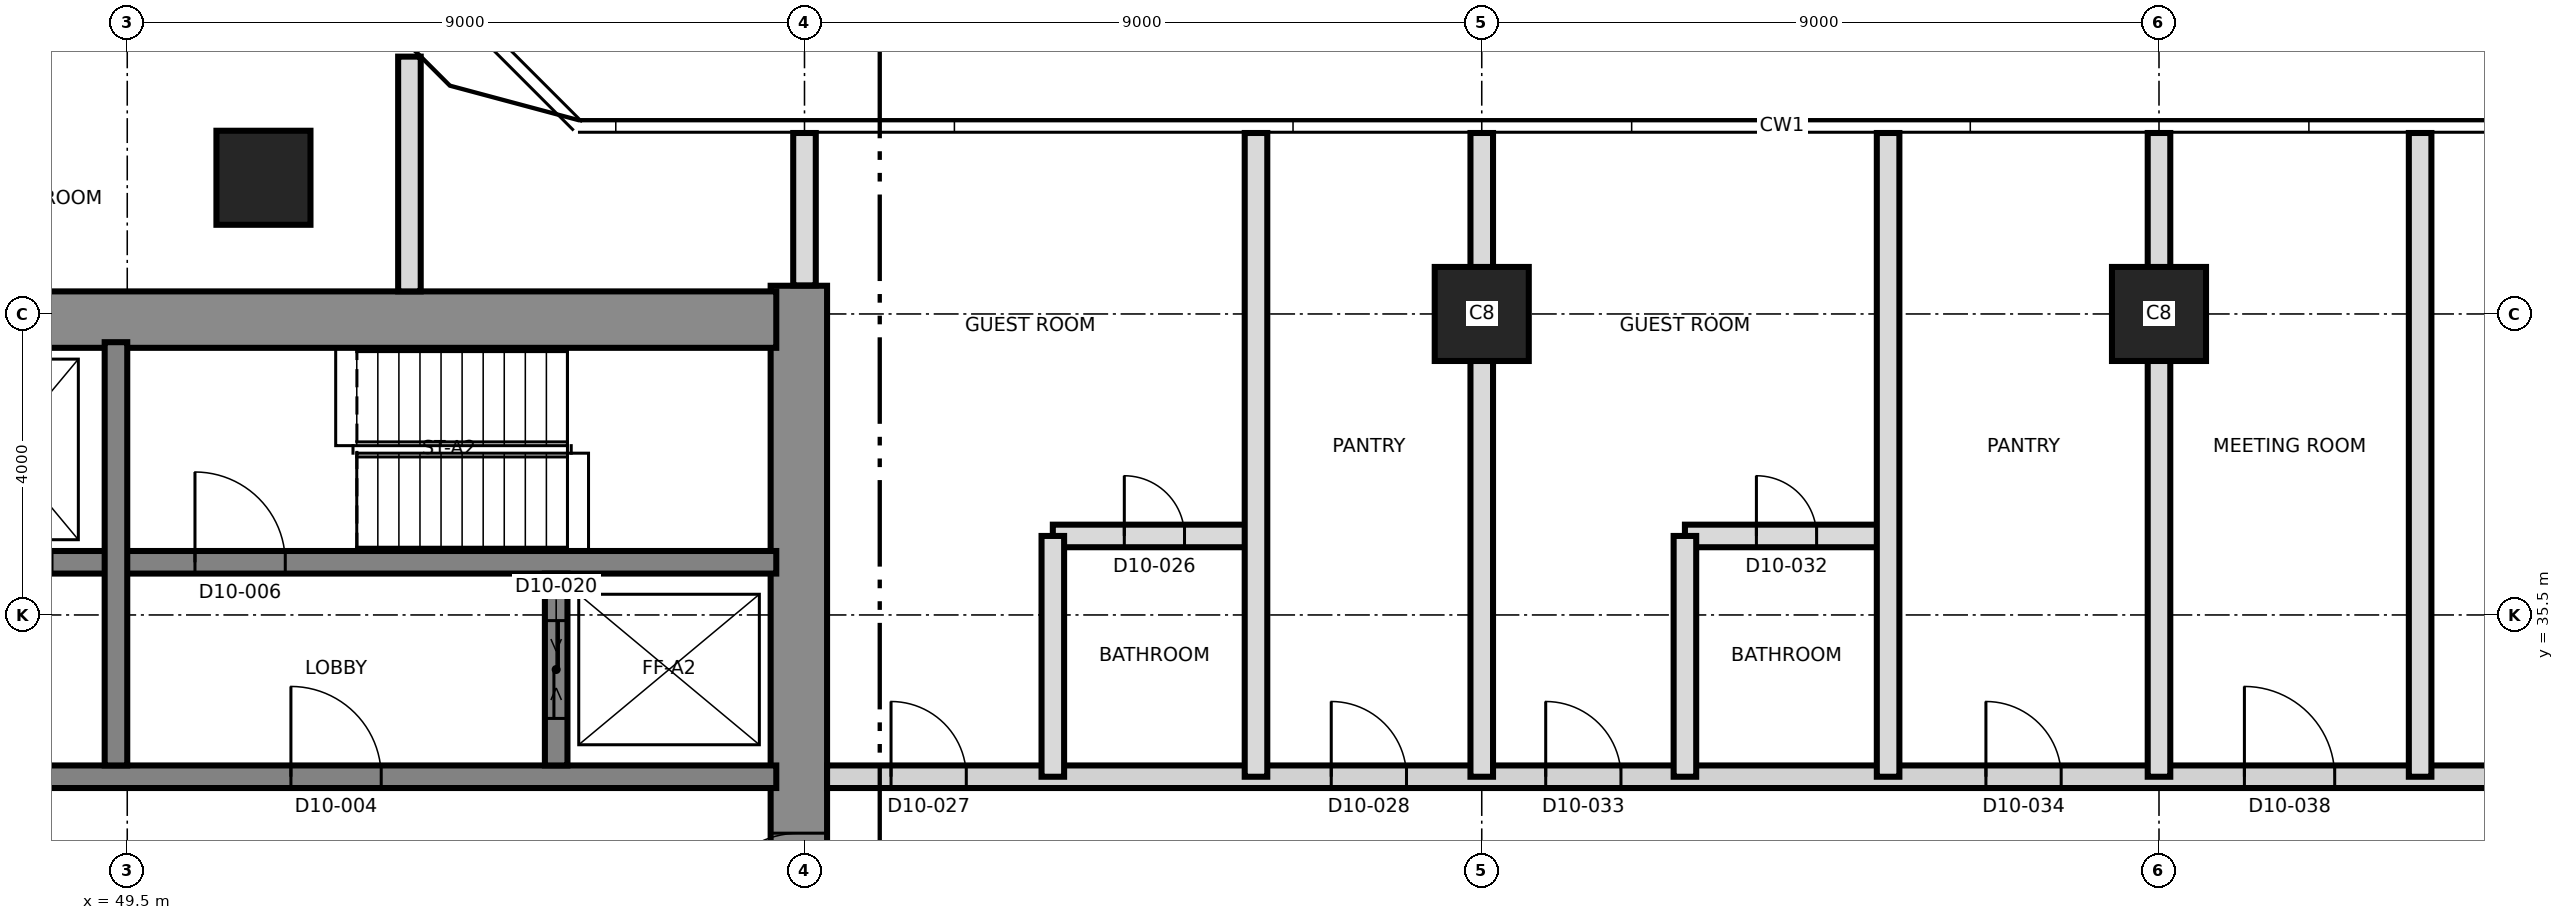
"""IFC4 building model, lengths in metres.
Left out: names, types, materials, properties, quantities, classifications, styles, units other than length and angle.
Written with IfcOpenShell. Run it as: python <this file> out.ifc"""

import sys

from ifc_helpers import new_model, si_unit, direction, frame, frame_2d, origin, origin_2d, place, context, subcontext, project, spatial, rectangle, extrude, element, fill, save


model = new_model("IFC4")
c1 = context("Model", 3, precision=1e-05, world=origin(), true_north=direction((0.0, 1.0)))
c2 = subcontext(c1, "Body", "Model", "MODEL_VIEW")
j1 = project(units=[si_unit("LENGTHUNIT", "METRE"), si_unit("PLANEANGLEUNIT", "RADIAN")], contexts=[c1])
p1 = place(None, origin())
s1 = spatial("IfcSite", under=j1, at=p1, CompositionType="ELEMENT")
p2 = place(p1, origin())
s2 = spatial("IfcBuilding", under=s1, at=p2, CompositionType="ELEMENT")
p3 = place(p2, frame((0.0, 0.0, 116.7)))
s3 = spatial("IfcBuildingStorey", under=s2, at=p3, CompositionType="ELEMENT", Elevation=116.7)
p4 = place(p3, frame((58.425, 21.125, 0.0), z_axis=(0.0, 0.0, 1.0), x_axis=(0.0, 1.0, 0.0)))
e1 = element("IfcWall", 1, at=p4, inside=s3, PredefinedType="SHEAR", context=c2, shape_type="SweptSolid", body=[
    extrude(rectangle(XDim=18.75, YDim=0.75, at=frame_2d((9.375, 0.0))), origin(), (0.0, 0.0, 1.0), 3.7),
])
p5 = place(p4, frame((10.275, 0.0, 0.0)))
e2 = element("IfcOpeningElement", 2, at=p5, cuts=e1, PredefinedType="OPENING", context=c2, shape_type="SweptSolid", body=[
    extrude(rectangle(XDim=1.2, YDim=2.1, at=frame_2d((0.6, 1.05))), frame((0.0, 0.385, 0.0), z_axis=(0.0, -1.0, 0.0), x_axis=(1.0, 0.0, 0.0)), (0.0, 0.0, 1.0), 0.77),
])
p6 = place(p3, frame((31.125, 39.425, 0.0), z_axis=(0.0, 0.0, 1.0), x_axis=(1.0, 0.0, 0.0)))
e3 = element("IfcWall", 3, at=p6, inside=s3, PredefinedType="SHEAR", context=c2, shape_type="SweptSolid", body=[
    extrude(rectangle(XDim=27.0, YDim=0.75, at=frame_2d((13.5, 0.0))), origin(), (0.0, 0.0, 1.0), 3.7),
])
p7 = place(p6, frame((10.575, 0.0, 0.0)))
e4 = element("IfcOpeningElement", 4, at=p7, cuts=e3, PredefinedType="OPENING", context=c2, shape_type="SweptSolid", body=[
    extrude(rectangle(XDim=1.2, YDim=2.1, at=frame_2d((0.6, 1.05))), frame((0.0, 0.385, 0.0), z_axis=(0.0, -1.0, 0.0), x_axis=(1.0, 0.0, 0.0)), (0.0, 0.0, 1.0), 0.77),
])
p8 = place(p3, frame((31.875, 33.35, 0.0), z_axis=(0.0, 0.0, 1.0), x_axis=(1.0, 0.0, 0.0)))
e5 = element("IfcWall", 5, at=p8, inside=s3, PredefinedType="SHEAR", context=c2, shape_type="SweptSolid", body=[
    extrude(rectangle(XDim=26.25, YDim=0.3, at=frame_2d((13.125, 0.0))), origin(), (0.0, 0.0, 1.0), 3.7),
])
p9 = place(p8, frame((13.775, 0.0, 0.0)))
e6 = element("IfcOpeningElement", 6, at=p9, cuts=e5, PredefinedType="OPENING", context=c2, shape_type="SweptSolid", body=[
    extrude(rectangle(XDim=1.4, YDim=2.1, at=frame_2d((0.7, 1.05))), frame((0.0, 0.16, 0.0), z_axis=(0.0, -1.0, 0.0), x_axis=(1.0, 0.0, 0.0)), (0.0, 0.0, 1.0), 0.32),
])
p10 = place(p8, frame((5.25, 0.0, 0.0)))
e7 = element("IfcOpeningElement", 7, at=p10, cuts=e5, PredefinedType="OPENING", context=c2, shape_type="SweptSolid", body=[
    extrude(rectangle(XDim=1.2, YDim=2.1, at=frame_2d((0.6, 1.05))), frame((0.0, 0.16, 0.0), z_axis=(0.0, -1.0, 0.0), x_axis=(1.0, 0.0, 0.0)), (0.0, 0.0, 1.0), 0.32),
])
p11 = place(p8, frame((19.8, 0.0, 0.0)))
e8 = element("IfcOpeningElement", 8, at=p11, cuts=e5, PredefinedType="OPENING", context=c2, shape_type="SweptSolid", body=[
    extrude(rectangle(XDim=1.2, YDim=2.1, at=frame_2d((0.6, 1.05))), frame((0.0, 0.16, 0.0), z_axis=(0.0, -1.0, 0.0), x_axis=(1.0, 0.0, 0.0)), (0.0, 0.0, 1.0), 0.32),
])
p12 = place(p3, frame((43.5, 36.2, 0.0), z_axis=(0.0, 0.0, 1.0), x_axis=(1.0, 0.0, 0.0)))
e9 = element("IfcWall", 9, at=p12, inside=s3, PredefinedType="SHEAR", context=c2, shape_type="SweptSolid", body=[
    extrude(rectangle(XDim=14.625, YDim=0.3, at=frame_2d((7.312, 0.0))), origin(), (0.0, 0.0, 1.0), 3.7),
])
p13 = place(p12, frame((6.9, 0.0, 0.0)))
e10 = element("IfcOpeningElement", 10, at=p13, cuts=e9, PredefinedType="OPENING", context=c2, shape_type="SweptSolid", body=[
    extrude(rectangle(XDim=1.2, YDim=2.1, at=frame_2d((0.6, 1.05))), frame((0.0, 0.16, 0.0), z_axis=(0.0, -1.0, 0.0), x_axis=(1.0, 0.0, 0.0)), (0.0, 0.0, 1.0), 0.32),
])
p14 = place(p12, frame((0.7, 0.0, 0.0)))
e11 = element("IfcOpeningElement", 11, at=p14, cuts=e9, PredefinedType="OPENING", context=c2, shape_type="SweptSolid", body=[
    extrude(rectangle(XDim=1.3, YDim=2.4, at=frame_2d((0.65, 1.2))), frame((0.0, 0.16, 0.0), z_axis=(0.0, -1.0, 0.0), x_axis=(1.0, 0.0, 0.0)), (0.0, 0.0, 1.0), 0.32),
])
p15 = place(p12, frame((3.7, 0.0, 0.0)))
e12 = element("IfcOpeningElement", 12, at=p15, cuts=e9, PredefinedType="OPENING", context=c2, shape_type="SweptSolid", body=[
    extrude(rectangle(XDim=1.3, YDim=2.4, at=frame_2d((0.65, 1.2))), frame((0.0, 0.16, 0.0), z_axis=(0.0, -1.0, 0.0), x_axis=(1.0, 0.0, 0.0)), (0.0, 0.0, 1.0), 0.32),
])
p16 = place(p3, frame((49.35, 33.5, 0.0), z_axis=(0.0, 0.0, 1.0), x_axis=(0.0, 1.0, 0.0)))
e13 = element("IfcWall", 13, at=p16, inside=s3, PredefinedType="SHEAR", context=c2, shape_type="SweptSolid", body=[
    extrude(rectangle(XDim=5.625, YDim=0.3, at=frame_2d((2.812, 0.0))), origin(), (0.0, 0.0, 1.0), 3.7),
])
p17 = place(p3, frame((55.2, 33.5, 0.0), z_axis=(0.0, 0.0, 1.0), x_axis=(0.0, 1.0, 0.0)))
e14 = element("IfcWall", 14, at=p17, inside=s3, PredefinedType="SHEAR", context=c2, shape_type="SweptSolid", body=[
    extrude(rectangle(XDim=2.55, YDim=0.3, at=frame_2d((1.275, 0.0))), origin(), (0.0, 0.0, 1.0), 3.7),
])
p18 = place(p17, frame((0.625, 0.0, 0.0)))
e15 = element("IfcOpeningElement", 15, at=p18, cuts=e14, PredefinedType="OPENING", context=c2, shape_type="SweptSolid", body=[
    extrude(rectangle(XDim=1.3, YDim=2.4, at=frame_2d((0.65, 1.2))), frame((0.0, 0.16, 0.0), z_axis=(0.0, -1.0, 0.0), x_axis=(1.0, 0.0, 0.0)), (0.0, 0.0, 1.0), 0.32),
])
for number, where, z_axis, x_axis in (
    (16, (67.5, 39.5, 0.0), (0.0, 0.0, 1.0), (1.0, 0.0, 0.0)),
    (17, (76.5, 39.5, 0.0), (0.0, 0.0, 1.0), (1.0, 0.0, 0.0)),
    (18, (51.31, 41.31, 0.0), (0.0, 0.0, 1.0), (1.0, 0.0, 0.0)),
):
    element("IfcColumn", number, at=place(p3, frame(where, z_axis=z_axis, x_axis=x_axis)), inside=s3, PredefinedType="COLUMN", context=c2, shape_type="SweptSolid", body=[
        extrude(rectangle(XDim=1.25, YDim=1.25, at=origin_2d()), origin(), (0.0, 0.0, 1.0), 3.7),
    ])
p19 = place(p3, frame((58.8, 33.35, 0.0), z_axis=(0.0, 0.0, 1.0), x_axis=(1.0, 0.0, 0.0)))
e19 = element("IfcWall", 19, at=p19, inside=s3, PredefinedType="PARTITIONING", context=c2, shape_type="SweptSolid", body=[
    extrude(rectangle(XDim=26.53, YDim=0.3, at=frame_2d((13.265, 0.0))), origin(), (0.0, 0.0, 1.0), 3.4),
])
p20 = place(p19, frame((0.85, 0.0, 0.0)))
e20 = element("IfcOpeningElement", 20, at=p20, cuts=e19, PredefinedType="OPENING", context=c2, shape_type="SweptSolid", body=[
    extrude(rectangle(XDim=1.0, YDim=2.1, at=frame_2d((0.5, 1.05))), frame((0.0, 0.16, 0.0), z_axis=(0.0, -1.0, 0.0), x_axis=(1.0, 0.0, 0.0)), (0.0, 0.0, 1.0), 0.32),
])
p21 = place(p19, frame((6.7, 0.0, 0.0)))
e21 = element("IfcOpeningElement", 21, at=p21, cuts=e19, PredefinedType="OPENING", context=c2, shape_type="SweptSolid", body=[
    extrude(rectangle(XDim=1.0, YDim=2.1, at=frame_2d((0.5, 1.05))), frame((0.0, 0.16, 0.0), z_axis=(0.0, -1.0, 0.0), x_axis=(1.0, 0.0, 0.0)), (0.0, 0.0, 1.0), 0.32),
])
p22 = place(p19, frame((9.55, 0.0, 0.0)))
e22 = element("IfcOpeningElement", 22, at=p22, cuts=e19, PredefinedType="OPENING", context=c2, shape_type="SweptSolid", body=[
    extrude(rectangle(XDim=1.0, YDim=2.1, at=frame_2d((0.5, 1.05))), frame((0.0, 0.16, 0.0), z_axis=(0.0, -1.0, 0.0), x_axis=(1.0, 0.0, 0.0)), (0.0, 0.0, 1.0), 0.32),
])
p23 = place(p19, frame((15.4, 0.0, 0.0)))
e23 = element("IfcOpeningElement", 23, at=p23, cuts=e19, PredefinedType="OPENING", context=c2, shape_type="SweptSolid", body=[
    extrude(rectangle(XDim=1.0, YDim=2.1, at=frame_2d((0.5, 1.05))), frame((0.0, 0.16, 0.0), z_axis=(0.0, -1.0, 0.0), x_axis=(1.0, 0.0, 0.0)), (0.0, 0.0, 1.0), 0.32),
])
p24 = place(p19, frame((18.835, 0.0, 0.0)))
e24 = element("IfcOpeningElement", 24, at=p24, cuts=e19, PredefinedType="OPENING", context=c2, shape_type="SweptSolid", body=[
    extrude(rectangle(XDim=1.2, YDim=2.1, at=frame_2d((0.6, 1.05))), frame((0.0, 0.16, 0.0), z_axis=(0.0, -1.0, 0.0), x_axis=(1.0, 0.0, 0.0)), (0.0, 0.0, 1.0), 0.32),
])
p25 = place(p19, frame((22.085, 0.0, 0.0)))
e25 = element("IfcOpeningElement", 25, at=p25, cuts=e19, PredefinedType="OPENING", context=c2, shape_type="SweptSolid", body=[
    extrude(rectangle(XDim=1.0, YDim=2.1, at=frame_2d((0.5, 1.05))), frame((0.0, 0.16, 0.0), z_axis=(0.0, -1.0, 0.0), x_axis=(1.0, 0.0, 0.0)), (0.0, 0.0, 1.0), 0.32),
])
p26 = place(p3, frame((61.8, 36.55, 0.0), z_axis=(0.0, 0.0, 1.0), x_axis=(1.0, 0.0, 0.0)))
e26 = element("IfcWall", 26, at=p26, inside=s3, PredefinedType="PARTITIONING", context=c2, shape_type="SweptSolid", body=[
    extrude(rectangle(XDim=2.7, YDim=0.3, at=frame_2d((1.35, 0.0))), origin(), (0.0, 0.0, 1.0), 3.4),
])
p27 = place(p26, frame((0.95, 0.0, 0.0)))
e27 = element("IfcOpeningElement", 27, at=p27, cuts=e26, PredefinedType="OPENING", context=c2, shape_type="SweptSolid", body=[
    extrude(rectangle(XDim=0.8, YDim=2.1, at=frame_2d((0.4, 1.05))), frame((0.0, 0.16, 0.0), z_axis=(0.0, -1.0, 0.0), x_axis=(1.0, 0.0, 0.0)), (0.0, 0.0, 1.0), 0.32),
])
p28 = place(p3, frame((70.2, 36.55, 0.0), z_axis=(0.0, 0.0, 1.0), x_axis=(1.0, 0.0, 0.0)))
e28 = element("IfcWall", 28, at=p28, inside=s3, PredefinedType="PARTITIONING", context=c2, shape_type="SweptSolid", body=[
    extrude(rectangle(XDim=2.7, YDim=0.3, at=frame_2d((1.35, 0.0))), origin(), (0.0, 0.0, 1.0), 3.4),
])
p29 = place(p28, frame((0.95, 0.0, 0.0)))
e29 = element("IfcOpeningElement", 29, at=p29, cuts=e28, PredefinedType="OPENING", context=c2, shape_type="SweptSolid", body=[
    extrude(rectangle(XDim=0.8, YDim=2.1, at=frame_2d((0.4, 1.05))), frame((0.0, 0.16, 0.0), z_axis=(0.0, -1.0, 0.0), x_axis=(1.0, 0.0, 0.0)), (0.0, 0.0, 1.0), 0.32),
])
p30 = place(p3, frame((53.25, 39.8, 0.0), z_axis=(0.0, 0.0, 1.0), x_axis=(0.0, 1.0, 0.0)))
e30 = element("IfcWall", 30, at=p30, inside=s3, PredefinedType="PARTITIONING", context=c2, shape_type="SweptSolid", body=[
    extrude(rectangle(XDim=3.12, YDim=0.3, at=frame_2d((1.56, 0.0))), origin(), (0.0, 0.0, 1.0), 3.4),
])
p31 = place(p3, frame((58.5, 39.88, 0.0), z_axis=(0.0, 0.0, 1.0), x_axis=(0.0, 1.0, 0.0)))
e31 = element("IfcWall", 31, at=p31, inside=s3, PredefinedType="PARTITIONING", context=c2, shape_type="SweptSolid", body=[
    extrude(rectangle(XDim=2.025, YDim=0.3, at=frame_2d((1.013, 0.0))), origin(), (0.0, 0.0, 1.0), 3.4),
])
p32 = place(p3, frame((61.8, 33.35, 0.0), z_axis=(0.0, 0.0, 1.0), x_axis=(0.0, 1.0, 0.0)))
e32 = element("IfcWall", 32, at=p32, inside=s3, PredefinedType="PARTITIONING", context=c2, shape_type="SweptSolid", body=[
    extrude(rectangle(XDim=3.2, YDim=0.3, at=frame_2d((1.6, 0.0))), origin(), (0.0, 0.0, 1.0), 3.4),
])
for number, where, z_axis, x_axis in (
    (33, (64.5, 33.35, 0.0), (0.0, 0.0, 1.0), (0.0, 1.0, 0.0)),
    (34, (67.5, 33.35, 0.0), (0.0, 0.0, 1.0), (0.0, 1.0, 0.0)),
):
    element("IfcWall", number, at=place(p3, frame(where, z_axis=z_axis, x_axis=x_axis)), inside=s3, PredefinedType="PARTITIONING", context=c2, shape_type="SweptSolid", body=[
        extrude(rectangle(XDim=8.555, YDim=0.3, at=frame_2d((4.277, 0.0))), origin(), (0.0, 0.0, 1.0), 3.4),
    ])
p33 = place(p3, frame((70.2, 33.35, 0.0), z_axis=(0.0, 0.0, 1.0), x_axis=(0.0, 1.0, 0.0)))
e35 = element("IfcWall", 35, at=p33, inside=s3, PredefinedType="PARTITIONING", context=c2, shape_type="SweptSolid", body=[
    extrude(rectangle(XDim=3.2, YDim=0.3, at=frame_2d((1.6, 0.0))), origin(), (0.0, 0.0, 1.0), 3.4),
])
for number, where, z_axis, x_axis in (
    (36, (72.9, 33.35, 0.0), (0.0, 0.0, 1.0), (0.0, 1.0, 0.0)),
    (37, (76.5, 33.35, 0.0), (0.0, 0.0, 1.0), (0.0, 1.0, 0.0)),
    (38, (79.97, 33.35, 0.0), (0.0, 0.0, 1.0), (0.0, 1.0, 0.0)),
):
    element("IfcWall", number, at=place(p3, frame(where, z_axis=z_axis, x_axis=x_axis)), inside=s3, PredefinedType="PARTITIONING", context=c2, shape_type="SweptSolid", body=[
        extrude(rectangle(XDim=8.555, YDim=0.3, at=frame_2d((4.277, 0.0))), origin(), (0.0, 0.0, 1.0), 3.4),
    ])
p34 = place(p11, origin())
e39 = element("IfcDoor", 39, at=p34, inside=s3, OperationType="SINGLE_SWING_RIGHT", PredefinedType="DOOR", context=c2, shape_type="SweptSolid", body=[
    extrude(rectangle(XDim=1.2, YDim=2.1, at=frame_2d((0.6, 1.05))), frame((0.0, 0.025, 0.0), z_axis=(0.0, -1.0, 0.0), x_axis=(1.0, 0.0, 0.0)), (0.0, 0.0, 1.0), 0.05),
])
fill(e8, e39)
p35 = place(p13, origin())
e40 = element("IfcDoor", 40, at=p35, inside=s3, OperationType="SINGLE_SWING_LEFT", PredefinedType="DOOR", context=c2, shape_type="SweptSolid", body=[
    extrude(rectangle(XDim=1.2, YDim=2.1, at=frame_2d((0.6, 1.05))), frame((0.0, 0.025, 0.0), z_axis=(0.0, -1.0, 0.0), x_axis=(1.0, 0.0, 0.0)), (0.0, 0.0, 1.0), 0.05),
])
fill(e10, e40)
p36 = place(p5, origin())
e41 = element("IfcDoor", 41, at=p36, inside=s3, OperationType="SINGLE_SWING_LEFT", PredefinedType="DOOR", context=c2, shape_type="SweptSolid", body=[
    extrude(rectangle(XDim=1.2, YDim=2.1, at=frame_2d((0.6, 1.05))), frame((0.0, 0.025, 0.0), z_axis=(0.0, -1.0, 0.0), x_axis=(1.0, 0.0, 0.0)), (0.0, 0.0, 1.0), 0.05),
])
fill(e2, e41)
p37 = place(p18, origin())
e42 = element("IfcDoor", 42, at=p37, inside=s3, OperationType="SLIDING_TO_LEFT", PredefinedType="DOOR", context=c2, shape_type="SweptSolid", body=[
    extrude(rectangle(XDim=1.3, YDim=2.4, at=frame_2d((0.65, 1.2))), frame((0.0, 0.025, 0.0), z_axis=(0.0, -1.0, 0.0), x_axis=(1.0, 0.0, 0.0)), (0.0, 0.0, 1.0), 0.05),
])
fill(e15, e42)
p38 = place(p27, origin())
e43 = element("IfcDoor", 43, at=p38, inside=s3, OperationType="SINGLE_SWING_LEFT", PredefinedType="DOOR", context=c2, shape_type="SweptSolid", body=[
    extrude(rectangle(XDim=0.8, YDim=2.1, at=frame_2d((0.4, 1.05))), frame((0.0, 0.025, 0.0), z_axis=(0.0, -1.0, 0.0), x_axis=(1.0, 0.0, 0.0)), (0.0, 0.0, 1.0), 0.05),
])
fill(e27, e43)
p39 = place(p20, origin())
e44 = element("IfcDoor", 44, at=p39, inside=s3, OperationType="SINGLE_SWING_LEFT", PredefinedType="DOOR", context=c2, shape_type="SweptSolid", body=[
    extrude(rectangle(XDim=1.0, YDim=2.1, at=frame_2d((0.5, 1.05))), frame((0.0, 0.025, 0.0), z_axis=(0.0, -1.0, 0.0), x_axis=(1.0, 0.0, 0.0)), (0.0, 0.0, 1.0), 0.05),
])
fill(e20, e44)
p40 = place(p21, origin())
e45 = element("IfcDoor", 45, at=p40, inside=s3, OperationType="SINGLE_SWING_RIGHT", PredefinedType="DOOR", context=c2, shape_type="SweptSolid", body=[
    extrude(rectangle(XDim=1.0, YDim=2.1, at=frame_2d((0.5, 1.05))), frame((0.0, 0.025, 0.0), z_axis=(0.0, -1.0, 0.0), x_axis=(1.0, 0.0, 0.0)), (0.0, 0.0, 1.0), 0.05),
])
fill(e21, e45)
p41 = place(p29, origin())
e46 = element("IfcDoor", 46, at=p41, inside=s3, OperationType="SINGLE_SWING_LEFT", PredefinedType="DOOR", context=c2, shape_type="SweptSolid", body=[
    extrude(rectangle(XDim=0.8, YDim=2.1, at=frame_2d((0.4, 1.05))), frame((0.0, 0.025, 0.0), z_axis=(0.0, -1.0, 0.0), x_axis=(1.0, 0.0, 0.0)), (0.0, 0.0, 1.0), 0.05),
])
fill(e29, e46)
p42 = place(p22, origin())
e47 = element("IfcDoor", 47, at=p42, inside=s3, OperationType="SINGLE_SWING_LEFT", PredefinedType="DOOR", context=c2, shape_type="SweptSolid", body=[
    extrude(rectangle(XDim=1.0, YDim=2.1, at=frame_2d((0.5, 1.05))), frame((0.0, 0.025, 0.0), z_axis=(0.0, -1.0, 0.0), x_axis=(1.0, 0.0, 0.0)), (0.0, 0.0, 1.0), 0.05),
])
fill(e22, e47)
p43 = place(p23, origin())
e48 = element("IfcDoor", 48, at=p43, inside=s3, OperationType="SINGLE_SWING_RIGHT", PredefinedType="DOOR", context=c2, shape_type="SweptSolid", body=[
    extrude(rectangle(XDim=1.0, YDim=2.1, at=frame_2d((0.5, 1.05))), frame((0.0, 0.025, 0.0), z_axis=(0.0, -1.0, 0.0), x_axis=(1.0, 0.0, 0.0)), (0.0, 0.0, 1.0), 0.05),
])
fill(e23, e48)
p44 = place(p24, origin())
e49 = element("IfcDoor", 49, at=p44, inside=s3, OperationType="SINGLE_SWING_LEFT", PredefinedType="DOOR", context=c2, shape_type="SweptSolid", body=[
    extrude(rectangle(XDim=1.2, YDim=2.1, at=frame_2d((0.6, 1.05))), frame((0.0, 0.025, 0.0), z_axis=(0.0, -1.0, 0.0), x_axis=(1.0, 0.0, 0.0)), (0.0, 0.0, 1.0), 0.05),
])
fill(e24, e49)
save(model, sys.argv[1])
